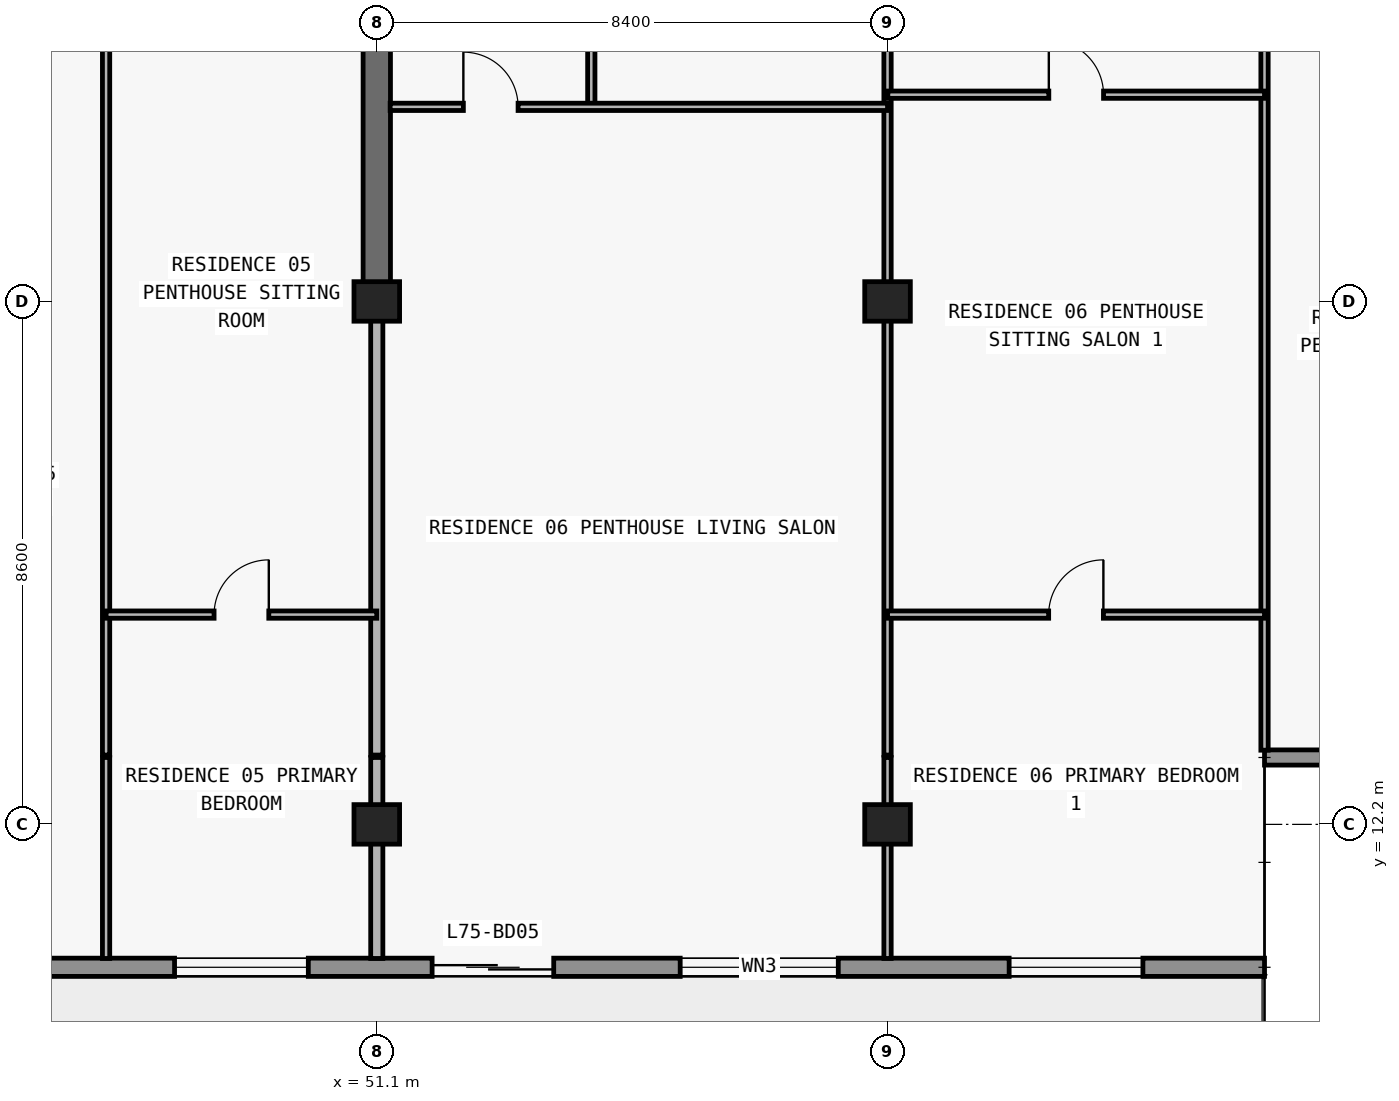
"""IFC4 building model, lengths in metres.
Left out: names, types, materials, properties, quantities, classifications, styles, units other than length and angle.
Written with IfcOpenShell. Run it as: python <this file> out.ifc"""

import sys

from ifc_helpers import new_model, si_unit, direction, frame, frame_2d, origin, origin_2d, place, context, subcontext, project, spatial, rectangle, extrude, element, fill, save


model = new_model("IFC4")
c1 = context("Model", 3, precision=1e-05, world=origin(), true_north=direction((0.0, 1.0)))
c2 = subcontext(c1, "Body", "Model", "MODEL_VIEW")
j1 = project(units=[si_unit("LENGTHUNIT", "METRE"), si_unit("PLANEANGLEUNIT", "RADIAN")], contexts=[c1])
p1 = place(None, origin())
s1 = spatial("IfcSite", under=j1, at=p1, CompositionType="ELEMENT")
p2 = place(p1, origin())
s2 = spatial("IfcBuilding", under=s1, at=p2, CompositionType="ELEMENT")
p3 = place(p2, frame((0.0, 0.0, 266.1)))
s3 = spatial("IfcBuildingStorey", under=s2, at=p3, CompositionType="ELEMENT", Elevation=266.1)
for number, where, z_axis, x_axis in (
    (1, (51.1, 12.2, 0.0), (0.0, 0.0, 1.0), (1.0, 0.0, 0.0)),
    (2, (59.5, 12.2, 0.0), (0.0, 0.0, 1.0), (1.0, 0.0, 0.0)),
    (3, (51.1, 20.8, 0.0), (0.0, 0.0, 1.0), (1.0, 0.0, 0.0)),
    (4, (59.5, 20.8, 0.0), (0.0, 0.0, 1.0), (1.0, 0.0, 0.0)),
):
    element("IfcColumn", number, at=place(p3, frame(where, z_axis=z_axis, x_axis=x_axis)), inside=s3, PredefinedType="COLUMN", context=c2, shape_type="SweptSolid", body=[
        extrude(rectangle(XDim=0.75, YDim=0.65, at=origin_2d()), origin(), (0.0, 0.0, 1.0), 3.0),
    ])
p4 = place(p3, frame((51.1, 20.8, 0.0), z_axis=(0.0, 0.0, 1.0), x_axis=(0.0, 1.0, 0.0)))
e5 = element("IfcWall", 5, at=p4, inside=s3, PredefinedType="SHEAR", context=c2, shape_type="SweptSolid", body=[
    extrude(rectangle(XDim=8.6, YDim=0.45, at=frame_2d((4.3, 0.0))), origin(), (0.0, 0.0, 1.0), 3.0),
])
p5 = place(p3, frame((65.7, 9.85, 0.0), z_axis=(0.0, 0.0, 1.0), x_axis=(-1.0, 0.0, 0.0)))
e6 = element("IfcWall", 6, at=p5, inside=s3, PredefinedType="STANDARD", context=c2, shape_type="SweptSolid", body=[
    extrude(rectangle(XDim=53.6, YDim=0.3, at=frame_2d((26.8, 0.0))), origin(), (0.0, 0.0, 1.0), 3.0),
])
p6 = place(p5, frame((48.05, 0.0, 0.85)))
e7 = element("IfcOpeningElement", 7, at=p6, cuts=e6, PredefinedType="OPENING", context=c2, shape_type="SweptSolid", body=[
    extrude(rectangle(XDim=1.8, YDim=1.55, at=frame_2d((0.9, 0.775))), frame((0.0, 0.16, 0.0), z_axis=(0.0, -1.0, 0.0), x_axis=(1.0, 0.0, 0.0)), (0.0, 0.0, 1.0), 0.32),
])
p7 = place(p5, frame((44.09, 0.0, 0.0)))
e8 = element("IfcOpeningElement", 8, at=p7, cuts=e6, PredefinedType="OPENING", context=c2, shape_type="SweptSolid", body=[
    extrude(rectangle(XDim=2.0, YDim=2.3, at=frame_2d((1.0, 1.15))), frame((0.0, 0.16, 0.0), z_axis=(0.0, -1.0, 0.0), x_axis=(1.0, 0.0, 0.0)), (0.0, 0.0, 1.0), 0.32),
])
p8 = place(p5, frame((39.99, 0.0, 0.85)))
e9 = element("IfcOpeningElement", 9, at=p8, cuts=e6, PredefinedType="OPENING", context=c2, shape_type="SweptSolid", body=[
    extrude(rectangle(XDim=1.8, YDim=1.55, at=frame_2d((0.9, 0.775))), frame((0.0, 0.16, 0.0), z_axis=(0.0, -1.0, 0.0), x_axis=(1.0, 0.0, 0.0)), (0.0, 0.0, 1.0), 0.32),
])
p9 = place(p5, frame((36.026, 0.0, 0.0)))
e10 = element("IfcOpeningElement", 10, at=p9, cuts=e6, PredefinedType="OPENING", context=c2, shape_type="SweptSolid", body=[
    extrude(rectangle(XDim=2.0, YDim=2.3, at=frame_2d((1.0, 1.15))), frame((0.0, 0.16, 0.0), z_axis=(0.0, -1.0, 0.0), x_axis=(1.0, 0.0, 0.0)), (0.0, 0.0, 1.0), 0.32),
])
p10 = place(p5, frame((31.726, 0.0, 0.85)))
e11 = element("IfcOpeningElement", 11, at=p10, cuts=e6, PredefinedType="OPENING", context=c2, shape_type="SweptSolid", body=[
    extrude(rectangle(XDim=2.2, YDim=1.55, at=frame_2d((1.1, 0.775))), frame((0.0, 0.16, 0.0), z_axis=(0.0, -1.0, 0.0), x_axis=(1.0, 0.0, 0.0)), (0.0, 0.0, 1.0), 0.32),
])
p11 = place(p5, frame((27.51, 0.0, 0.0)))
e12 = element("IfcOpeningElement", 12, at=p11, cuts=e6, PredefinedType="OPENING", context=c2, shape_type="SweptSolid", body=[
    extrude(rectangle(XDim=2.0, YDim=2.3, at=frame_2d((1.0, 1.15))), frame((0.0, 0.16, 0.0), z_axis=(0.0, -1.0, 0.0), x_axis=(1.0, 0.0, 0.0)), (0.0, 0.0, 1.0), 0.32),
])
p12 = place(p5, frame((23.81, 0.0, 0.85)))
e13 = element("IfcOpeningElement", 13, at=p12, cuts=e6, PredefinedType="OPENING", context=c2, shape_type="SweptSolid", body=[
    extrude(rectangle(XDim=1.8, YDim=1.55, at=frame_2d((0.9, 0.775))), frame((0.0, 0.16, 0.0), z_axis=(0.0, -1.0, 0.0), x_axis=(1.0, 0.0, 0.0)), (0.0, 0.0, 1.0), 0.32),
])
p13 = place(p5, frame((20.026, 0.0, 0.0)))
e14 = element("IfcOpeningElement", 14, at=p13, cuts=e6, PredefinedType="OPENING", context=c2, shape_type="SweptSolid", body=[
    extrude(rectangle(XDim=2.0, YDim=2.3, at=frame_2d((1.0, 1.15))), frame((0.0, 0.16, 0.0), z_axis=(0.0, -1.0, 0.0), x_axis=(1.0, 0.0, 0.0)), (0.0, 0.0, 1.0), 0.32),
])
p14 = place(p5, frame((15.726, 0.0, 0.85)))
e15 = element("IfcOpeningElement", 15, at=p14, cuts=e6, PredefinedType="OPENING", context=c2, shape_type="SweptSolid", body=[
    extrude(rectangle(XDim=2.2, YDim=1.55, at=frame_2d((1.1, 0.775))), frame((0.0, 0.16, 0.0), z_axis=(0.0, -1.0, 0.0), x_axis=(1.0, 0.0, 0.0)), (0.0, 0.0, 1.0), 0.32),
])
p15 = place(p5, frame((11.69, 0.0, 0.0)))
e16 = element("IfcOpeningElement", 16, at=p15, cuts=e6, PredefinedType="OPENING", context=c2, shape_type="SweptSolid", body=[
    extrude(rectangle(XDim=2.0, YDim=2.3, at=frame_2d((1.0, 1.15))), frame((0.0, 0.16, 0.0), z_axis=(0.0, -1.0, 0.0), x_axis=(1.0, 0.0, 0.0)), (0.0, 0.0, 1.0), 0.32),
])
p16 = place(p5, frame((7.01, 0.0, 0.65)))
e17 = element("IfcOpeningElement", 17, at=p16, cuts=e6, PredefinedType="OPENING", context=c2, shape_type="SweptSolid", body=[
    extrude(rectangle(XDim=2.6, YDim=1.85, at=frame_2d((1.3, 0.925))), frame((0.0, 0.16, 0.0), z_axis=(0.0, -1.0, 0.0), x_axis=(1.0, 0.0, 0.0)), (0.0, 0.0, 1.0), 0.32),
])
p17 = place(p5, frame((2.0, 0.0, 0.85)))
e18 = element("IfcOpeningElement", 18, at=p17, cuts=e6, PredefinedType="OPENING", context=c2, shape_type="SweptSolid", body=[
    extrude(rectangle(XDim=2.2, YDim=1.55, at=frame_2d((1.1, 0.775))), frame((0.0, 0.16, 0.0), z_axis=(0.0, -1.0, 0.0), x_axis=(1.0, 0.0, 0.0)), (0.0, 0.0, 1.0), 0.32),
])
p18 = place(p3, frame((65.7, 13.3, 0.0), z_axis=(0.0, 0.0, 1.0), x_axis=(1.0, 0.0, 0.0)))
e19 = element("IfcWall", 19, at=p18, inside=s3, PredefinedType="ELEMENTEDWALL", context=c2, shape_type="SweptSolid", body=[
    extrude(rectangle(XDim=3.85, YDim=0.25, at=frame_2d((1.925, 0.0))), origin(), (0.0, 0.0, 1.0), 3.0),
])
p19 = place(p3, frame((46.648, 9.995, 0.0), z_axis=(0.0, 0.0, 1.0), x_axis=(0.0, 1.0, 0.0)))
e20 = element("IfcWall", 20, at=p19, inside=s3, PredefinedType="PARTITIONING", context=c2, shape_type="SweptSolid", body=[
    extrude(rectangle(XDim=3.305, YDim=0.12, at=frame_2d((1.652, 0.0))), origin(), (0.0, 0.0, 1.0), 3.0),
])
p20 = place(p3, frame((46.648, 13.34, 0.0), z_axis=(0.0, 0.0, 1.0), x_axis=(0.0, 1.0, 0.0)))
e21 = element("IfcWall", 21, at=p20, inside=s3, PredefinedType="PARTITIONING", context=c2, shape_type="SweptSolid", body=[
    extrude(rectangle(XDim=11.89, YDim=0.12, at=frame_2d((5.945, 0.0))), origin(), (0.0, 0.0, 1.0), 3.0),
])
p21 = place(p3, frame((51.1, 9.995, 0.0), z_axis=(0.0, 0.0, 1.0), x_axis=(0.0, 1.0, 0.0)))
e22 = element("IfcWall", 22, at=p21, inside=s3, PredefinedType="PARTITIONING", context=c2, shape_type="SweptSolid", body=[
    extrude(rectangle(XDim=3.305, YDim=0.2, at=frame_2d((1.652, 0.0))), origin(), (0.0, 0.0, 1.0), 2.213),
])
p22 = place(p3, frame((51.1, 13.34, 0.0), z_axis=(0.0, 0.0, 1.0), x_axis=(0.0, 1.0, 0.0)))
e23 = element("IfcWall", 23, at=p22, inside=s3, PredefinedType="PARTITIONING", context=c2, shape_type="SweptSolid", body=[
    extrude(rectangle(XDim=7.455, YDim=0.2, at=frame_2d((3.728, 0.0))), origin(), (0.0, 0.0, 1.0), 2.213),
])
p23 = place(p3, frame((54.628, 24.0, 0.0), z_axis=(0.0, 0.0, 1.0), x_axis=(0.0, 1.0, 0.0)))
e24 = element("IfcWall", 24, at=p23, inside=s3, PredefinedType="PARTITIONING", context=c2, shape_type="SweptSolid", body=[
    extrude(rectangle(XDim=1.23, YDim=0.12, at=frame_2d((0.615, 0.0))), origin(), (0.0, 0.0, 1.0), 3.0),
])
p24 = place(p3, frame((59.5, 9.995, 0.0), z_axis=(0.0, 0.0, 1.0), x_axis=(0.0, 1.0, 0.0)))
e25 = element("IfcWall", 25, at=p24, inside=s3, PredefinedType="PARTITIONING", context=c2, shape_type="SweptSolid", body=[
    extrude(rectangle(XDim=3.305, YDim=0.12, at=frame_2d((1.652, 0.0))), origin(), (0.0, 0.0, 1.0), 2.213),
])
p25 = place(p3, frame((59.5, 13.34, 0.0), z_axis=(0.0, 0.0, 1.0), x_axis=(0.0, 1.0, 0.0)))
e26 = element("IfcWall", 26, at=p25, inside=s3, PredefinedType="PARTITIONING", context=c2, shape_type="SweptSolid", body=[
    extrude(rectangle(XDim=11.89, YDim=0.12, at=frame_2d((5.945, 0.0))), origin(), (0.0, 0.0, 1.0), 2.213),
])
p26 = place(p3, frame((65.7, 13.42, 0.0), z_axis=(0.0, 0.0, 1.0), x_axis=(0.0, 1.0, 0.0)))
e27 = element("IfcWall", 27, at=p26, inside=s3, PredefinedType="PARTITIONING", context=c2, shape_type="SweptSolid", body=[
    extrude(rectangle(XDim=11.81, YDim=0.12, at=frame_2d((5.905, 0.0))), origin(), (0.0, 0.0, 1.0), 3.0),
])
p27 = place(p3, frame((46.648, 15.65, 0.0), z_axis=(0.0, 0.0, 1.0), x_axis=(1.0, 0.0, 0.0)))
e28 = element("IfcWall", 28, at=p27, inside=s3, PredefinedType="PARTITIONING", context=c2, shape_type="SweptSolid", body=[
    extrude(rectangle(XDim=4.452, YDim=0.12, at=frame_2d((2.226, 0.0))), origin(), (0.0, 0.0, 1.0), 3.0),
])
p28 = place(p27, frame((1.776, 0.0, 0.0)))
e29 = element("IfcOpeningElement", 29, at=p28, cuts=e28, PredefinedType="OPENING", context=c2, shape_type="SweptSolid", body=[
    extrude(rectangle(XDim=0.9, YDim=2.15, at=frame_2d((0.45, 1.075))), frame((0.0, 0.07, 0.0), z_axis=(0.0, -1.0, 0.0), x_axis=(1.0, 0.0, 0.0)), (0.0, 0.0, 1.0), 0.14),
])
p29 = place(p3, frame((59.5, 15.65, 0.0), z_axis=(0.0, 0.0, 1.0), x_axis=(1.0, 0.0, 0.0)))
e30 = element("IfcWall", 30, at=p29, inside=s3, PredefinedType="PARTITIONING", context=c2, shape_type="SweptSolid", body=[
    extrude(rectangle(XDim=6.2, YDim=0.12, at=frame_2d((3.1, 0.0))), origin(), (0.0, 0.0, 1.0), 3.0),
])
p30 = place(p29, frame((2.65, 0.0, 0.0)))
e31 = element("IfcOpeningElement", 31, at=p30, cuts=e30, PredefinedType="OPENING", context=c2, shape_type="SweptSolid", body=[
    extrude(rectangle(XDim=0.9, YDim=2.15, at=frame_2d((0.45, 1.075))), frame((0.0, 0.07, 0.0), z_axis=(0.0, -1.0, 0.0), x_axis=(1.0, 0.0, 0.0)), (0.0, 0.0, 1.0), 0.14),
])
p31 = place(p3, frame((51.32, 24.0, 0.0), z_axis=(0.0, 0.0, 1.0), x_axis=(1.0, 0.0, 0.0)))
e32 = element("IfcWall", 32, at=p31, inside=s3, PredefinedType="PARTITIONING", context=c2, shape_type="SweptSolid", body=[
    extrude(rectangle(XDim=8.18, YDim=0.12, at=frame_2d((4.09, 0.0))), origin(), (0.0, 0.0, 1.0), 3.0),
])
p32 = place(p31, frame((1.204, 0.0, 0.0)))
e33 = element("IfcOpeningElement", 33, at=p32, cuts=e32, PredefinedType="OPENING", context=c2, shape_type="SweptSolid", body=[
    extrude(rectangle(XDim=0.9, YDim=2.15, at=frame_2d((0.45, 1.075))), frame((0.0, 0.07, 0.0), z_axis=(0.0, -1.0, 0.0), x_axis=(1.0, 0.0, 0.0)), (0.0, 0.0, 1.0), 0.14),
])
p33 = place(p3, frame((59.505, 24.2, 0.0), z_axis=(0.0, 0.0, 1.0), x_axis=(1.0, 0.0, 0.0)))
e34 = element("IfcWall", 34, at=p33, inside=s3, PredefinedType="PARTITIONING", context=c2, shape_type="SweptSolid", body=[
    extrude(rectangle(XDim=6.195, YDim=0.12, at=frame_2d((3.098, 0.0))), origin(), (0.0, 0.0, 1.0), 3.0),
])
p34 = place(p33, frame((2.647, 0.0, 0.0)))
e35 = element("IfcOpeningElement", 35, at=p34, cuts=e34, PredefinedType="OPENING", context=c2, shape_type="SweptSolid", body=[
    extrude(rectangle(XDim=0.9, YDim=2.15, at=frame_2d((0.45, 1.075))), frame((0.0, 0.07, 0.0), z_axis=(0.0, -1.0, 0.0), x_axis=(1.0, 0.0, 0.0)), (0.0, 0.0, 1.0), 0.14),
])
p35 = place(p14, origin())
e36 = element("IfcWindow", 36, at=p35, inside=s3, PartitioningType="SINGLE_PANEL", PredefinedType="WINDOW", context=c2, shape_type="SweptSolid", body=[
    extrude(rectangle(XDim=2.2, YDim=1.55, at=frame_2d((1.1, 0.775))), frame((0.0, 0.03, 0.0), z_axis=(0.0, -1.0, 0.0), x_axis=(1.0, 0.0, 0.0)), (0.0, 0.0, 1.0), 0.06),
])
fill(e15, e36)
p36 = place(p15, origin())
e37 = element("IfcDoor", 37, at=p36, inside=s3, OperationType="DOUBLE_DOOR_SLIDING", PredefinedType="DOOR", context=c2, shape_type="SweptSolid", body=[
    extrude(rectangle(XDim=2.0, YDim=2.3, at=frame_2d((1.0, 1.15))), frame((0.0, 0.025, 0.0), z_axis=(0.0, -1.0, 0.0), x_axis=(1.0, 0.0, 0.0)), (0.0, 0.0, 1.0), 0.05),
])
fill(e16, e37)
p37 = place(p16, origin())
e38 = element("IfcWindow", 38, at=p37, inside=s3, PartitioningType="SINGLE_PANEL", PredefinedType="WINDOW", context=c2, shape_type="SweptSolid", body=[
    extrude(rectangle(XDim=2.6, YDim=1.85, at=frame_2d((1.3, 0.925))), frame((0.0, 0.03, 0.0), z_axis=(0.0, -1.0, 0.0), x_axis=(1.0, 0.0, 0.0)), (0.0, 0.0, 1.0), 0.06),
])
fill(e17, e38)
p38 = place(p17, origin())
e39 = element("IfcWindow", 39, at=p38, inside=s3, PartitioningType="SINGLE_PANEL", PredefinedType="WINDOW", context=c2, shape_type="SweptSolid", body=[
    extrude(rectangle(XDim=2.2, YDim=1.55, at=frame_2d((1.1, 0.775))), frame((0.0, 0.03, 0.0), z_axis=(0.0, -1.0, 0.0), x_axis=(1.0, 0.0, 0.0)), (0.0, 0.0, 1.0), 0.06),
])
fill(e18, e39)
p39 = place(p28, origin())
e40 = element("IfcDoor", 40, at=p39, inside=s3, OperationType="SINGLE_SWING_RIGHT", PredefinedType="DOOR", context=c2, shape_type="SweptSolid", body=[
    extrude(rectangle(XDim=0.9, YDim=2.15, at=frame_2d((0.45, 1.075))), frame((0.0, 0.025, 0.0), z_axis=(0.0, -1.0, 0.0), x_axis=(1.0, 0.0, 0.0)), (0.0, 0.0, 1.0), 0.05),
])
fill(e29, e40)
p40 = place(p32, origin())
e41 = element("IfcDoor", 41, at=p40, inside=s3, OperationType="SINGLE_SWING_LEFT", PredefinedType="DOOR", context=c2, shape_type="SweptSolid", body=[
    extrude(rectangle(XDim=0.9, YDim=2.15, at=frame_2d((0.45, 1.075))), frame((0.0, 0.025, 0.0), z_axis=(0.0, -1.0, 0.0), x_axis=(1.0, 0.0, 0.0)), (0.0, 0.0, 1.0), 0.05),
])
fill(e33, e41)
p41 = place(p34, origin())
e42 = element("IfcDoor", 42, at=p41, inside=s3, OperationType="SINGLE_SWING_LEFT", PredefinedType="DOOR", context=c2, shape_type="SweptSolid", body=[
    extrude(rectangle(XDim=0.9, YDim=2.15, at=frame_2d((0.45, 1.075))), frame((0.0, 0.025, 0.0), z_axis=(0.0, -1.0, 0.0), x_axis=(1.0, 0.0, 0.0)), (0.0, 0.0, 1.0), 0.05),
])
fill(e35, e42)
p42 = place(p30, origin())
e43 = element("IfcDoor", 43, at=p42, inside=s3, OperationType="SINGLE_SWING_RIGHT", PredefinedType="DOOR", context=c2, shape_type="SweptSolid", body=[
    extrude(rectangle(XDim=0.9, YDim=2.15, at=frame_2d((0.45, 1.075))), frame((0.0, 0.025, 0.0), z_axis=(0.0, -1.0, 0.0), x_axis=(1.0, 0.0, 0.0)), (0.0, 0.0, 1.0), 0.05),
])
fill(e31, e43)
save(model, sys.argv[1])
